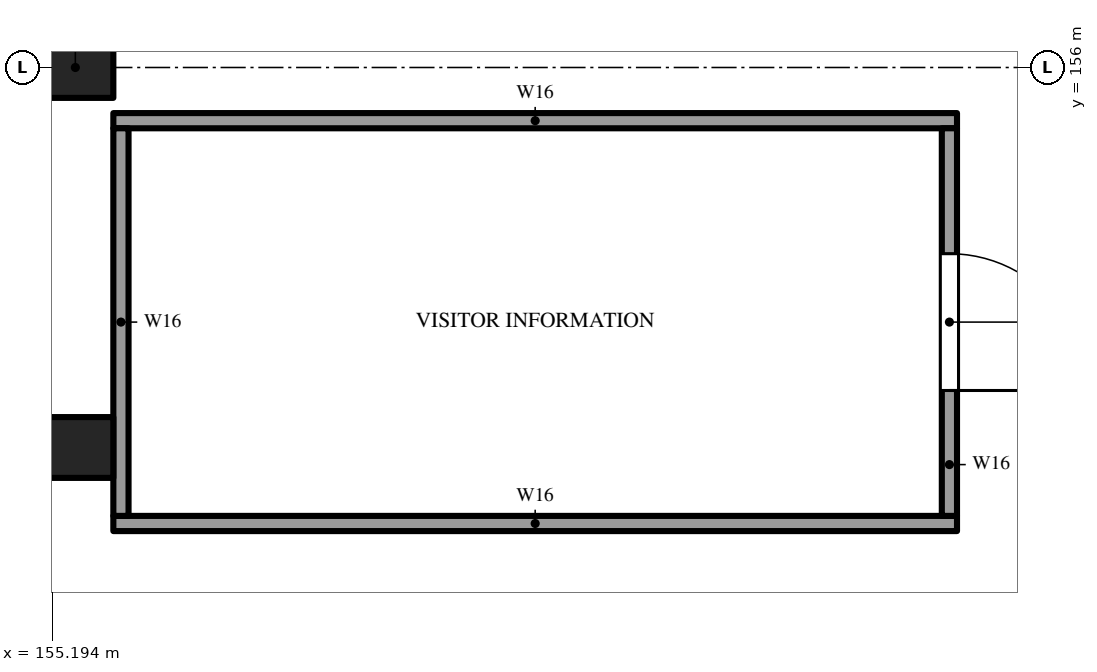
"""IFC4 building model, lengths in metres.
Left out: names, types, materials, properties, quantities, classifications, styles, units other than length and angle.
Written with IfcOpenShell. Run it as: python <this file> out.ifc"""

import sys

from ifc_helpers import new_model, si_unit, direction, frame, frame_2d, origin, origin_2d, place, context, subcontext, project, spatial, rectangle, extrude, element, fill, save


model = new_model("IFC4")
c1 = context("Model", 3, precision=1e-05, world=origin(), true_north=direction((0.0, 1.0)))
c2 = subcontext(c1, "Body", "Model", "MODEL_VIEW")
j1 = project(units=[si_unit("LENGTHUNIT", "METRE"), si_unit("PLANEANGLEUNIT", "RADIAN")], contexts=[c1])
p1 = place(None, origin())
s1 = spatial("IfcSite", under=j1, at=p1, CompositionType="ELEMENT")
p2 = place(p1, origin())
s2 = spatial("IfcBuilding", under=s1, at=p2, CompositionType="ELEMENT")
p3 = place(p2, origin())
s3 = spatial("IfcBuildingStorey", under=s2, at=p3, CompositionType="ELEMENT", Elevation=0.0)
for number, where, z_axis, x_axis in (
    (1, (155.5, 151.0, -0.4), (0.0, 0.0, 1.0), (1.0, 0.0, 0.0)),
    (2, (155.5, 156.0, -0.4), (0.0, 0.0, 1.0), (1.0, 0.0, 0.0)),
):
    element("IfcColumn", number, at=place(p3, frame(where, z_axis=z_axis, x_axis=x_axis)), inside=s3, PredefinedType="COLUMN", context=c2, shape_type="SweptSolid", body=[
        extrude(rectangle(XDim=1.0, YDim=0.8, at=origin_2d()), origin(), (0.0, 0.0, 1.0), 7.6),
    ])
for number, where, z_axis, x_axis in (
    (3, (156.0, 150.0, 0.0), (0.0, 0.0, 1.0), (1.0, 0.0, 0.0)),
    (4, (156.0, 155.3, 0.0), (0.0, 0.0, 1.0), (1.0, 0.0, 0.0)),
):
    element("IfcWall", number, at=place(p3, frame(where, z_axis=z_axis, x_axis=x_axis)), inside=s3, PredefinedType="SOLIDWALL", context=c2, shape_type="SweptSolid", body=[
        extrude(rectangle(XDim=11.1, YDim=0.2, at=frame_2d((5.55, 0.0))), origin(), (0.0, 0.0, 1.0), 4.3),
    ])
p4 = place(p3, frame((156.1, 150.1, 0.0), z_axis=(0.0, 0.0, 1.0), x_axis=(0.0, 1.0, 0.0)))
e5 = element("IfcWall", 5, at=p4, inside=s3, PredefinedType="SOLIDWALL", context=c2, shape_type="SweptSolid", body=[
    extrude(rectangle(XDim=5.1, YDim=0.2, at=frame_2d((2.55, 0.0))), origin(), (0.0, 0.0, 1.0), 4.3),
])
p5 = place(p3, frame((167.0, 150.1, 0.0), z_axis=(0.0, 0.0, 1.0), x_axis=(0.0, 1.0, 0.0)))
e6 = element("IfcWall", 6, at=p5, inside=s3, PredefinedType="SOLIDWALL", context=c2, shape_type="SweptSolid", body=[
    extrude(rectangle(XDim=5.1, YDim=0.2, at=frame_2d((2.55, 0.0))), origin(), (0.0, 0.0, 1.0), 4.3),
])
p6 = place(p5, frame((1.65, 0.0, 0.0)))
e7 = element("IfcOpeningElement", 7, at=p6, cuts=e6, PredefinedType="OPENING", context=c2, shape_type="SweptSolid", body=[
    extrude(rectangle(XDim=1.8, YDim=2.1, at=frame_2d((0.9, 1.05))), frame((0.0, 0.11, 0.0), z_axis=(0.0, -1.0, 0.0), x_axis=(1.0, 0.0, 0.0)), (0.0, 0.0, 1.0), 0.22),
])
p7 = place(p6, frame((1.8, 0.0, 0.0), z_axis=(0.0, 0.0, 1.0), x_axis=(-1.0, 0.0, 0.0)))
e8 = element("IfcDoor", 8, at=p7, inside=s3, OperationType="SINGLE_SWING_RIGHT", PredefinedType="DOOR", context=c2, shape_type="SweptSolid", body=[
    extrude(rectangle(XDim=1.8, YDim=2.1, at=frame_2d((0.9, 1.05))), frame((0.0, 0.025, 0.0), z_axis=(0.0, -1.0, 0.0), x_axis=(1.0, 0.0, 0.0)), (0.0, 0.0, 1.0), 0.05),
])
fill(e7, e8)
save(model, sys.argv[1])
